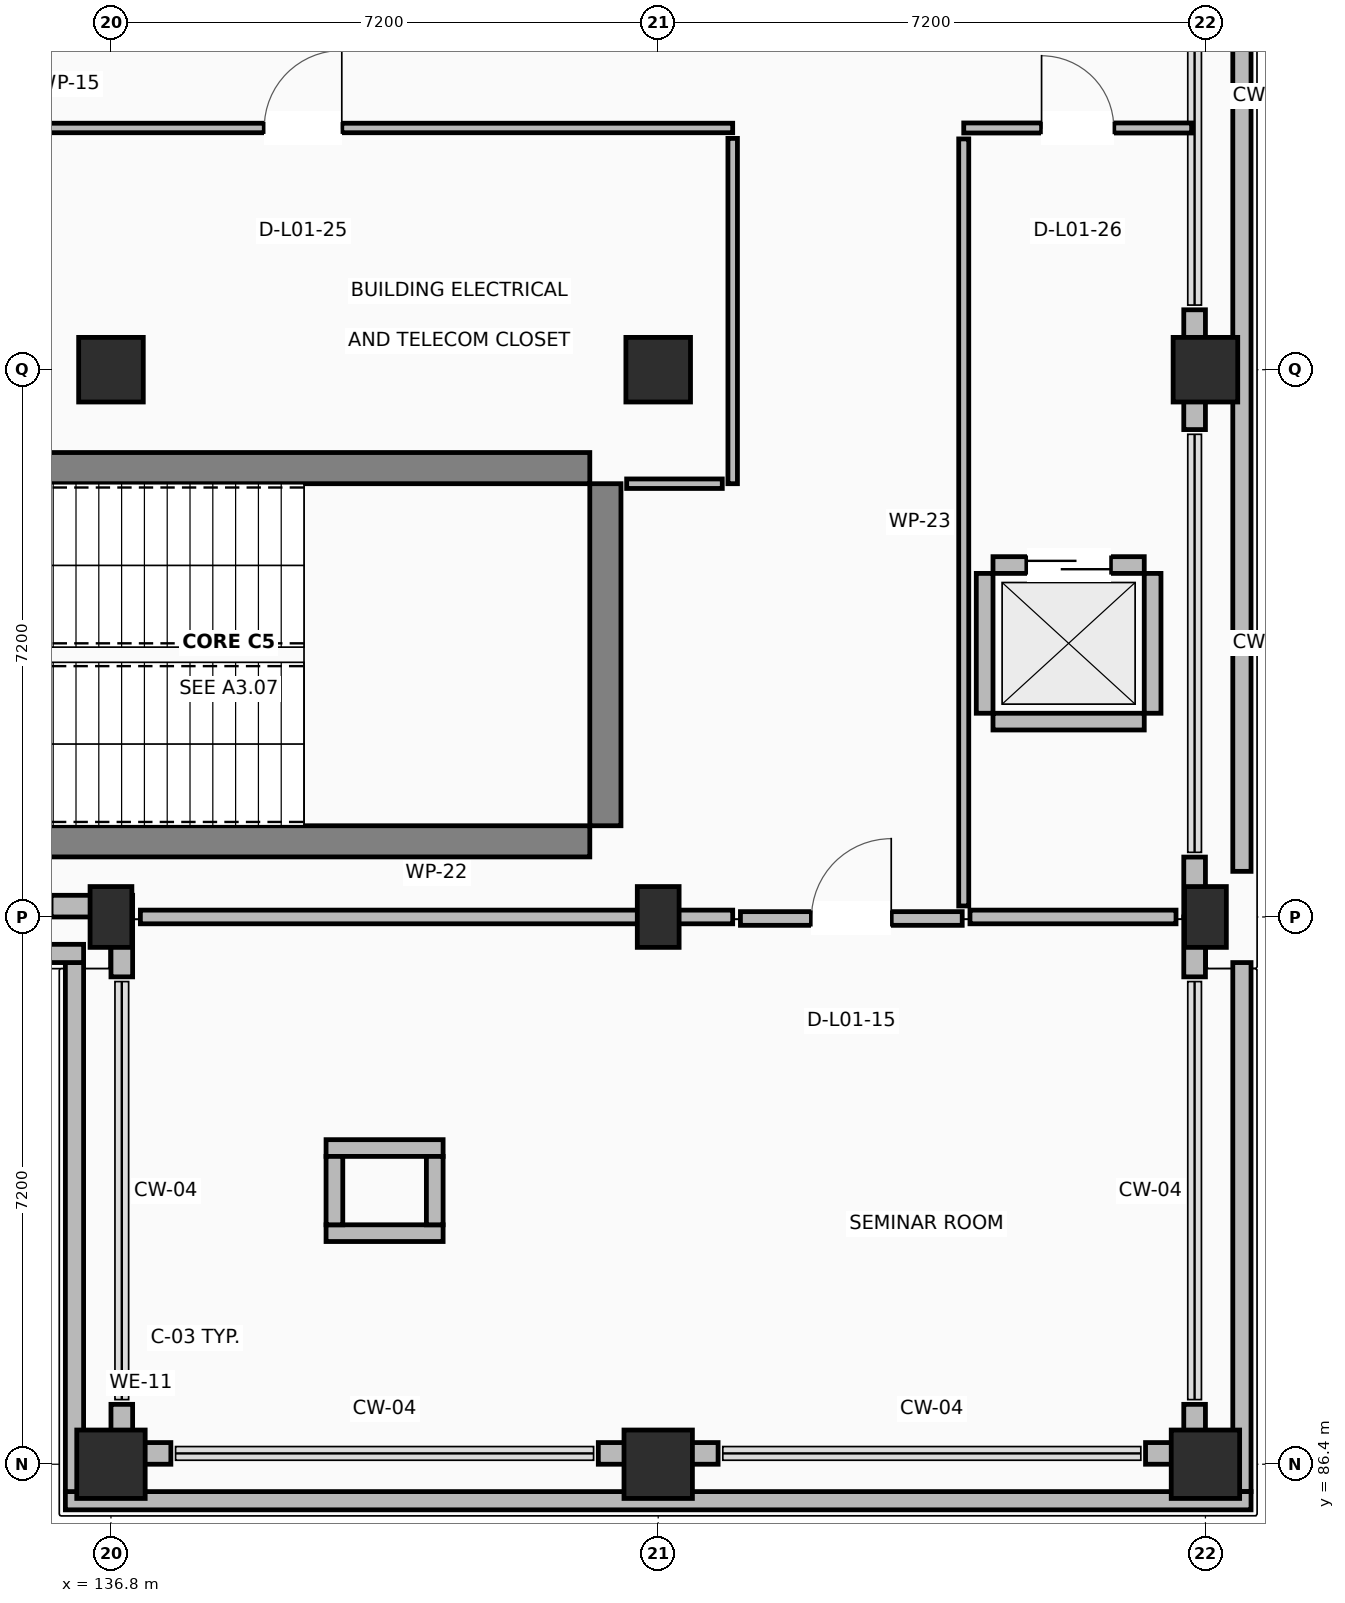
"""IFC4 building model, lengths in metres.
Left out: names, types, materials, properties, quantities, classifications, styles, units other than length and angle.
Written with IfcOpenShell. Run it as: python <this file> out.ifc"""

import sys

from ifc_helpers import new_model, si_unit, direction, frame, frame_2d, origin, origin_2d, place, context, subcontext, project, spatial, rectangle, extrude, element, fill, save


model = new_model("IFC4")
c1 = context("Model", 3, precision=1e-05, world=origin(), true_north=direction((0.0, 1.0)))
c2 = subcontext(c1, "Body", "Model", "MODEL_VIEW")
j1 = project(units=[si_unit("LENGTHUNIT", "METRE"), si_unit("PLANEANGLEUNIT", "RADIAN")], contexts=[c1])
p1 = place(None, origin())
s1 = spatial("IfcSite", under=j1, at=p1, CompositionType="ELEMENT")
p2 = place(p1, origin())
s2 = spatial("IfcBuilding", under=s1, at=p2, CompositionType="ELEMENT")
p3 = place(p2, frame((0.0, 0.0, 4.5)))
s3 = spatial("IfcBuildingStorey", under=s2, at=p3, CompositionType="ELEMENT", Elevation=4.5)
p4 = place(p3, frame((136.8, 86.4, 0.0), z_axis=(0.0, 0.0, 1.0), x_axis=(1.0, 0.0, 0.0)))
e1 = element("IfcColumn", 1, at=p4, inside=s3, PredefinedType="COLUMN", context=c2, shape_type="SweptSolid", body=[
    extrude(rectangle(XDim=0.9, YDim=0.9, at=origin_2d()), origin(), (0.0, 0.0, 1.0), 4.22),
])
p5 = place(p3, frame((136.8, 93.6, 0.0), z_axis=(0.0, 0.0, 1.0), x_axis=(1.0, 0.0, 0.0)))
e2 = element("IfcColumn", 2, at=p5, inside=s3, PredefinedType="COLUMN", context=c2, shape_type="SweptSolid", body=[
    extrude(rectangle(XDim=0.55, YDim=0.8, at=origin_2d()), origin(), (0.0, 0.0, 1.0), 4.22),
])
p6 = place(p3, frame((136.8, 100.8, 0.0), z_axis=(0.0, 0.0, 1.0), x_axis=(1.0, 0.0, 0.0)))
e3 = element("IfcColumn", 3, at=p6, inside=s3, PredefinedType="COLUMN", context=c2, shape_type="SweptSolid", body=[
    extrude(rectangle(XDim=0.85, YDim=0.85, at=origin_2d()), origin(), (0.0, 0.0, 1.0), 4.22),
])
p7 = place(p3, frame((144.0, 86.4, 0.0), z_axis=(0.0, 0.0, 1.0), x_axis=(1.0, 0.0, 0.0)))
e4 = element("IfcColumn", 4, at=p7, inside=s3, PredefinedType="COLUMN", context=c2, shape_type="SweptSolid", body=[
    extrude(rectangle(XDim=0.9, YDim=0.9, at=origin_2d()), origin(), (0.0, 0.0, 1.0), 4.22),
])
p8 = place(p3, frame((144.0, 93.6, 0.0), z_axis=(0.0, 0.0, 1.0), x_axis=(1.0, 0.0, 0.0)))
e5 = element("IfcColumn", 5, at=p8, inside=s3, PredefinedType="COLUMN", context=c2, shape_type="SweptSolid", body=[
    extrude(rectangle(XDim=0.55, YDim=0.8, at=origin_2d()), origin(), (0.0, 0.0, 1.0), 4.22),
])
p9 = place(p3, frame((144.0, 100.8, 0.0), z_axis=(0.0, 0.0, 1.0), x_axis=(1.0, 0.0, 0.0)))
e6 = element("IfcColumn", 6, at=p9, inside=s3, PredefinedType="COLUMN", context=c2, shape_type="SweptSolid", body=[
    extrude(rectangle(XDim=0.85, YDim=0.85, at=origin_2d()), origin(), (0.0, 0.0, 1.0), 4.22),
])
p10 = place(p3, frame((151.2, 86.4, 0.0), z_axis=(0.0, 0.0, 1.0), x_axis=(1.0, 0.0, 0.0)))
e7 = element("IfcColumn", 7, at=p10, inside=s3, PredefinedType="COLUMN", context=c2, shape_type="SweptSolid", body=[
    extrude(rectangle(XDim=0.9, YDim=0.9, at=origin_2d()), origin(), (0.0, 0.0, 1.0), 4.22),
])
p11 = place(p3, frame((151.2, 93.6, 0.0), z_axis=(0.0, 0.0, 1.0), x_axis=(1.0, 0.0, 0.0)))
e8 = element("IfcColumn", 8, at=p11, inside=s3, PredefinedType="COLUMN", context=c2, shape_type="SweptSolid", body=[
    extrude(rectangle(XDim=0.55, YDim=0.8, at=origin_2d()), origin(), (0.0, 0.0, 1.0), 4.22),
])
p12 = place(p3, frame((151.2, 100.8, 0.0), z_axis=(0.0, 0.0, 1.0), x_axis=(1.0, 0.0, 0.0)))
e9 = element("IfcColumn", 9, at=p12, inside=s3, PredefinedType="COLUMN", context=c2, shape_type="SweptSolid", body=[
    extrude(rectangle(XDim=0.85, YDim=0.85, at=origin_2d()), origin(), (0.0, 0.0, 1.0), 4.22),
])
for number, where, z_axis, x_axis in (
    (10, (133.6, 94.595, 0.0), (0.0, 0.0, 1.0), (1.0, 0.0, 0.0)),
    (11, (133.6, 99.505, 0.0), (0.0, 0.0, 1.0), (1.0, 0.0, 0.0)),
):
    element("IfcWall", number, at=place(p3, frame(where, z_axis=z_axis, x_axis=x_axis)), inside=s3, PredefinedType="SHEAR", context=c2, shape_type="SweptSolid", body=[
        extrude(rectangle(XDim=9.5, YDim=0.41, at=frame_2d((4.75, 0.0))), origin(), (0.0, 0.0, 1.0), 4.22),
    ])
p13 = place(p3, frame((143.305, 94.8, 0.0), z_axis=(0.0, 0.0, 1.0), x_axis=(0.0, 1.0, 0.0)))
e12 = element("IfcWall", 12, at=p13, inside=s3, PredefinedType="SHEAR", context=c2, shape_type="SweptSolid", body=[
    extrude(rectangle(XDim=4.5, YDim=0.41, at=frame_2d((2.25, 0.0))), origin(), (0.0, 0.0, 1.0), 4.22),
])
p14 = place(p3, frame((136.8, 86.542, 0.0), z_axis=(0.0, 0.0, 1.0), x_axis=(1.0, 0.0, 0.0)))
e13 = element("IfcWall", 13, at=p14, inside=s3, PredefinedType="STANDARD", context=c2, shape_type="SweptSolid", body=[
    extrude(rectangle(XDim=0.788, YDim=0.285, at=frame_2d((0.394, 0.0))), origin(), (0.0, 0.0, 1.0), 3.26),
])
p15 = place(p3, frame((143.212, 86.542, 0.0), z_axis=(0.0, 0.0, 1.0), x_axis=(1.0, 0.0, 0.0)))
e14 = element("IfcWall", 14, at=p15, inside=s3, PredefinedType="STANDARD", context=c2, shape_type="SweptSolid", body=[
    extrude(rectangle(XDim=1.576, YDim=0.285, at=frame_2d((0.788, 0.0))), origin(), (0.0, 0.0, 1.0), 3.26),
])
p16 = place(p3, frame((150.412, 86.542, 0.0), z_axis=(0.0, 0.0, 1.0), x_axis=(1.0, 0.0, 0.0)))
e15 = element("IfcWall", 15, at=p16, inside=s3, PredefinedType="STANDARD", context=c2, shape_type="SweptSolid", body=[
    extrude(rectangle(XDim=0.788, YDim=0.285, at=frame_2d((0.394, 0.0))), origin(), (0.0, 0.0, 1.0), 3.26),
])
p17 = place(p3, frame((151.058, 86.685, 0.0), z_axis=(0.0, 0.0, 1.0), x_axis=(0.0, 1.0, 0.0)))
e16 = element("IfcWall", 16, at=p17, inside=s3, PredefinedType="STANDARD", context=c2, shape_type="SweptSolid", body=[
    extrude(rectangle(XDim=0.503, YDim=0.285, at=frame_2d((0.251, 0.0))), origin(), (0.0, 0.0, 1.0), 3.26),
])
p18 = place(p3, frame((151.058, 92.812, 0.0), z_axis=(0.0, 0.0, 1.0), x_axis=(0.0, 1.0, 0.0)))
e17 = element("IfcWall", 17, at=p18, inside=s3, PredefinedType="STANDARD", context=c2, shape_type="SweptSolid", body=[
    extrude(rectangle(XDim=0.788, YDim=0.285, at=frame_2d((0.394, 0.0))), origin(), (0.0, 0.0, 1.0), 3.26),
])
p19 = place(p3, frame((151.058, 93.6, 0.0), z_axis=(0.0, 0.0, 1.0), x_axis=(0.0, 1.0, 0.0)))
e18 = element("IfcWall", 18, at=p19, inside=s3, PredefinedType="STANDARD", context=c2, shape_type="SweptSolid", body=[
    extrude(rectangle(XDim=0.788, YDim=0.285, at=frame_2d((0.394, 0.0))), origin(), (0.0, 0.0, 1.0), 3.26),
])
p20 = place(p3, frame((151.058, 100.012, 0.0), z_axis=(0.0, 0.0, 1.0), x_axis=(0.0, 1.0, 0.0)))
e19 = element("IfcWall", 19, at=p20, inside=s3, PredefinedType="STANDARD", context=c2, shape_type="SweptSolid", body=[
    extrude(rectangle(XDim=1.576, YDim=0.285, at=frame_2d((0.788, 0.0))), origin(), (0.0, 0.0, 1.0), 3.26),
])
p21 = place(p3, frame((136.012, 93.742, 0.0), z_axis=(0.0, 0.0, 1.0), x_axis=(1.0, 0.0, 0.0)))
e20 = element("IfcWall", 20, at=p21, inside=s3, PredefinedType="STANDARD", context=c2, shape_type="SweptSolid", body=[
    extrude(rectangle(XDim=0.788, YDim=0.285, at=frame_2d((0.394, 0.0))), origin(), (0.0, 0.0, 1.0), 3.26),
])
p22 = place(p3, frame((136.942, 93.885, 0.0), z_axis=(0.0, 0.0, 1.0), x_axis=(0.0, -1.0, 0.0)))
e21 = element("IfcWall", 21, at=p22, inside=s3, PredefinedType="STANDARD", context=c2, shape_type="SweptSolid", body=[
    extrude(rectangle(XDim=1.073, YDim=0.285, at=frame_2d((0.537, 0.0))), origin(), (0.0, 0.0, 1.0), 3.26),
])
p23 = place(p3, frame((136.942, 87.188, 0.0), z_axis=(0.0, 0.0, 1.0), x_axis=(0.0, -1.0, 0.0)))
e22 = element("IfcWall", 22, at=p23, inside=s3, PredefinedType="STANDARD", context=c2, shape_type="SweptSolid", body=[
    extrude(rectangle(XDim=0.503, YDim=0.285, at=frame_2d((0.251, 0.0))), origin(), (0.0, 0.0, 1.0), 3.26),
])
p24 = place(p3, frame((151.68, 115.56, 0.0), z_axis=(0.0, 0.0, 1.0), x_axis=(0.0, -1.0, 0.0)))
e23 = element("IfcWall", 23, at=p24, inside=s3, PredefinedType="PARAPET", context=c2, shape_type="SweptSolid", body=[
    extrude(rectangle(XDim=21.36, YDim=0.24, at=frame_2d((10.68, 0.0))), origin(), (0.0, 0.0, 1.0), 1.12),
])
p25 = place(p3, frame((151.68, 93.0, 0.0), z_axis=(0.0, 0.0, 1.0), x_axis=(0.0, -1.0, 0.0)))
e24 = element("IfcWall", 24, at=p25, inside=s3, PredefinedType="PARAPET", context=c2, shape_type="SweptSolid", body=[
    extrude(rectangle(XDim=6.96, YDim=0.24, at=frame_2d((3.48, 0.0))), origin(), (0.0, 0.0, 1.0), 1.12),
])
p26 = place(p3, frame((151.8, 85.92, 0.0), z_axis=(0.0, 0.0, 1.0), x_axis=(-1.0, 0.0, 0.0)))
e25 = element("IfcWall", 25, at=p26, inside=s3, PredefinedType="PARAPET", context=c2, shape_type="SweptSolid", body=[
    extrude(rectangle(XDim=15.6, YDim=0.24, at=frame_2d((7.8, 0.0))), origin(), (0.0, 0.0, 1.0), 1.12),
])
p27 = place(p3, frame((136.32, 86.04, 0.0), z_axis=(0.0, 0.0, 1.0), x_axis=(0.0, 1.0, 0.0)))
e26 = element("IfcWall", 26, at=p27, inside=s3, PredefinedType="PARAPET", context=c2, shape_type="SweptSolid", body=[
    extrude(rectangle(XDim=6.96, YDim=0.24, at=frame_2d((3.48, 0.0))), origin(), (0.0, 0.0, 1.0), 1.12),
])
p28 = place(p3, frame((136.44, 93.12, 0.0), z_axis=(0.0, 0.0, 1.0), x_axis=(-1.0, 0.0, 0.0)))
e27 = element("IfcWall", 27, at=p28, inside=s3, PredefinedType="PARAPET", context=c2, shape_type="SweptSolid", body=[
    extrude(rectangle(XDim=57.84, YDim=0.24, at=frame_2d((28.92, 0.0))), origin(), (0.0, 0.0, 1.0), 1.12),
])
p29 = place(p3, frame((148.405, 96.17, 0.0), z_axis=(0.0, 0.0, 1.0), x_axis=(1.0, 0.0, 0.0)))
e28 = element("IfcWall", 28, at=p29, inside=s3, PredefinedType="STANDARD", context=c2, shape_type="SweptSolid", body=[
    extrude(rectangle(XDim=1.99, YDim=0.22, at=frame_2d((0.995, 0.0))), origin(), (0.0, 0.0, 1.0), 3.26),
])
p30 = place(p3, frame((148.405, 98.23, 0.0), z_axis=(0.0, 0.0, 1.0), x_axis=(1.0, 0.0, 0.0)))
e29 = element("IfcWall", 29, at=p30, inside=s3, PredefinedType="STANDARD", context=c2, shape_type="SweptSolid", body=[
    extrude(rectangle(XDim=1.99, YDim=0.22, at=frame_2d((0.995, 0.0))), origin(), (0.0, 0.0, 1.0), 3.26),
])
p31 = place(p30, frame((0.445, 0.0, 0.0)))
e30 = element("IfcOpeningElement", 30, at=p31, cuts=e29, PredefinedType="OPENING", context=c2, shape_type="SweptSolid", body=[
    extrude(rectangle(XDim=1.1, YDim=2.15, at=frame_2d((0.55, 1.075))), frame((0.0, 0.12, 0.0), z_axis=(0.0, -1.0, 0.0), x_axis=(1.0, 0.0, 0.0)), (0.0, 0.0, 1.0), 0.24),
])
for number, where, z_axis, x_axis in (
    (31, (148.295, 96.28, 0.0), (0.0, 0.0, 1.0), (0.0, 1.0, 0.0)),
    (32, (150.505, 96.28, 0.0), (0.0, 0.0, 1.0), (0.0, 1.0, 0.0)),
):
    element("IfcWall", number, at=place(p3, frame(where, z_axis=z_axis, x_axis=x_axis)), inside=s3, PredefinedType="STANDARD", context=c2, shape_type="SweptSolid", body=[
        extrude(rectangle(XDim=1.84, YDim=0.22, at=frame_2d((0.92, 0.0))), origin(), (0.0, 0.0, 1.0), 3.26),
    ])
for number, where, z_axis, x_axis in (
    (33, (139.63, 89.44, 0.0), (0.0, 0.0, 1.0), (1.0, 0.0, 0.0)),
    (34, (139.63, 90.56, 0.0), (0.0, 0.0, 1.0), (1.0, 0.0, 0.0)),
):
    element("IfcWall", number, at=place(p3, frame(where, z_axis=z_axis, x_axis=x_axis)), inside=s3, PredefinedType="STANDARD", context=c2, shape_type="SweptSolid", body=[
        extrude(rectangle(XDim=1.54, YDim=0.22, at=frame_2d((0.77, 0.0))), origin(), (0.0, 0.0, 1.0), 3.26),
    ])
for number, where, z_axis, x_axis in (
    (35, (139.74, 89.55, 0.0), (0.0, 0.0, 1.0), (0.0, 1.0, 0.0)),
    (36, (141.06, 89.55, 0.0), (0.0, 0.0, 1.0), (0.0, 1.0, 0.0)),
):
    element("IfcWall", number, at=place(p3, frame(where, z_axis=z_axis, x_axis=x_axis)), inside=s3, PredefinedType="STANDARD", context=c2, shape_type="SweptSolid", body=[
        extrude(rectangle(XDim=0.9, YDim=0.22, at=frame_2d((0.45, 0.0))), origin(), (0.0, 0.0, 1.0), 3.26),
    ])
p32 = place(p3, frame((137.187, 93.6, 0.0), z_axis=(0.0, 0.0, 1.0), x_axis=(1.0, 0.0, 0.0)))
e37 = element("IfcWall", 37, at=p32, inside=s3, PredefinedType="PARTITIONING", context=c2, shape_type="SweptSolid", body=[
    extrude(rectangle(XDim=7.793, YDim=0.18, at=frame_2d((3.896, 0.0))), origin(), (0.0, 0.0, 1.0), 3.26),
])
p33 = place(p3, frame((145.082, 93.58, 0.0), z_axis=(0.0, 0.0, 1.0), x_axis=(1.0, 0.0, 0.0)))
e38 = element("IfcWall", 38, at=p33, inside=s3, PredefinedType="PARTITIONING", context=c2, shape_type="SweptSolid", body=[
    extrude(rectangle(XDim=2.918, YDim=0.18, at=frame_2d((1.459, 0.0))), origin(), (0.0, 0.0, 1.0), 3.26),
])
p34 = place(p33, frame((0.934, 0.0, 0.0)))
e39 = element("IfcOpeningElement", 39, at=p34, cuts=e38, PredefinedType="OPENING", context=c2, shape_type="SweptSolid", body=[
    extrude(rectangle(XDim=1.05, YDim=2.15, at=frame_2d((0.525, 1.075))), frame((0.0, 0.1, 0.0), z_axis=(0.0, -1.0, 0.0), x_axis=(1.0, 0.0, 0.0)), (0.0, 0.0, 1.0), 0.2),
])
p35 = place(p3, frame((148.102, 93.6, 0.0), z_axis=(0.0, 0.0, 1.0), x_axis=(1.0, 0.0, 0.0)))
e40 = element("IfcWall", 40, at=p35, inside=s3, PredefinedType="PARTITIONING", context=c2, shape_type="SweptSolid", body=[
    extrude(rectangle(XDim=2.711, YDim=0.18, at=frame_2d((1.355, 0.0))), origin(), (0.0, 0.0, 1.0), 3.26),
])
p36 = place(p3, frame((133.674, 103.98, 0.0), z_axis=(0.0, 0.0, 1.0), x_axis=(1.0, 0.0, 0.0)))
e41 = element("IfcWall", 41, at=p36, inside=s3, PredefinedType="PARTITIONING", context=c2, shape_type="SweptSolid", body=[
    extrude(rectangle(XDim=11.306, YDim=0.125, at=frame_2d((5.653, 0.0))), origin(), (0.0, 0.0, 1.0), 3.26),
])
p37 = place(p36, frame((5.143, 0.0, 0.0)))
e42 = element("IfcOpeningElement", 42, at=p37, cuts=e41, PredefinedType="OPENING", context=c2, shape_type="SweptSolid", body=[
    extrude(rectangle(XDim=1.02, YDim=2.15, at=frame_2d((0.51, 1.075))), frame((0.0, 0.073, 0.0), z_axis=(0.0, -1.0, 0.0), x_axis=(1.0, 0.0, 0.0)), (0.0, 0.0, 1.0), 0.145),
])
p38 = place(p3, frame((144.98, 103.843, 0.0), z_axis=(0.0, 0.0, 1.0), x_axis=(0.0, -1.0, 0.0)))
e43 = element("IfcWall", 43, at=p38, inside=s3, PredefinedType="PARTITIONING", context=c2, shape_type="SweptSolid", body=[
    extrude(rectangle(XDim=4.543, YDim=0.125, at=frame_2d((2.271, 0.0))), origin(), (0.0, 0.0, 1.0), 3.26),
])
p39 = place(p3, frame((144.843, 99.3, 0.0), z_axis=(0.0, 0.0, 1.0), x_axis=(-1.0, 0.0, 0.0)))
e44 = element("IfcWall", 44, at=p39, inside=s3, PredefinedType="PARTITIONING", context=c2, shape_type="SweptSolid", body=[
    extrude(rectangle(XDim=1.258, YDim=0.125, at=frame_2d((0.629, 0.0))), origin(), (0.0, 0.0, 1.0), 3.26),
])
p40 = place(p3, frame((148.02, 103.98, 0.0), z_axis=(0.0, 0.0, 1.0), x_axis=(1.0, 0.0, 0.0)))
e45 = element("IfcWall", 45, at=p40, inside=s3, PredefinedType="PARTITIONING", context=c2, shape_type="SweptSolid", body=[
    extrude(rectangle(XDim=2.998, YDim=0.132, at=frame_2d((1.499, 0.0))), origin(), (0.0, 0.0, 1.0), 3.26),
])
p41 = place(p40, frame((1.024, 0.0, 0.0)))
e46 = element("IfcOpeningElement", 46, at=p41, cuts=e45, PredefinedType="OPENING", context=c2, shape_type="SweptSolid", body=[
    extrude(rectangle(XDim=0.95, YDim=2.1, at=frame_2d((0.475, 1.05))), frame((0.0, 0.076, 0.0), z_axis=(0.0, -1.0, 0.0), x_axis=(1.0, 0.0, 0.0)), (0.0, 0.0, 1.0), 0.152),
])
p42 = place(p3, frame((148.02, 93.745, 0.0), z_axis=(0.0, 0.0, 1.0), x_axis=(0.0, 1.0, 0.0)))
e47 = element("IfcWall", 47, at=p42, inside=s3, PredefinedType="PARTITIONING", context=c2, shape_type="SweptSolid", body=[
    extrude(rectangle(XDim=10.091, YDim=0.132, at=frame_2d((5.045, 0.0))), origin(), (0.0, 0.0, 1.0), 3.26),
])
p43 = place(p31, origin())
e48 = element("IfcDoor", 48, at=p43, inside=s3, OperationType="SLIDING_TO_RIGHT", PredefinedType="DOOR", context=c2, shape_type="SweptSolid", body=[
    extrude(rectangle(XDim=1.1, YDim=2.15, at=frame_2d((0.55, 1.075))), frame((0.0, 0.025, 0.0), z_axis=(0.0, -1.0, 0.0), x_axis=(1.0, 0.0, 0.0)), (0.0, 0.0, 1.0), 0.05),
])
fill(e30, e48)
p44 = place(p34, origin())
e49 = element("IfcDoor", 49, at=p44, inside=s3, OperationType="SINGLE_SWING_RIGHT", PredefinedType="DOOR", context=c2, shape_type="SweptSolid", body=[
    extrude(rectangle(XDim=1.05, YDim=2.15, at=frame_2d((0.525, 1.075))), frame((0.0, 0.025, 0.0), z_axis=(0.0, -1.0, 0.0), x_axis=(1.0, 0.0, 0.0)), (0.0, 0.0, 1.0), 0.05),
])
fill(e39, e49)
p45 = place(p37, origin())
e50 = element("IfcDoor", 50, at=p45, inside=s3, OperationType="SINGLE_SWING_RIGHT", PredefinedType="DOOR", context=c2, shape_type="SweptSolid", body=[
    extrude(rectangle(XDim=1.02, YDim=2.15, at=frame_2d((0.51, 1.075))), frame((0.0, 0.025, 0.0), z_axis=(0.0, -1.0, 0.0), x_axis=(1.0, 0.0, 0.0)), (0.0, 0.0, 1.0), 0.05),
])
fill(e42, e50)
p46 = place(p41, origin())
e51 = element("IfcDoor", 51, at=p46, inside=s3, OperationType="SINGLE_SWING_LEFT", PredefinedType="DOOR", context=c2, shape_type="SweptSolid", body=[
    extrude(rectangle(XDim=0.95, YDim=2.1, at=frame_2d((0.475, 1.05))), frame((0.0, 0.025, 0.0), z_axis=(0.0, -1.0, 0.0), x_axis=(1.0, 0.0, 0.0)), (0.0, 0.0, 1.0), 0.05),
])
fill(e46, e51)
save(model, sys.argv[1])
